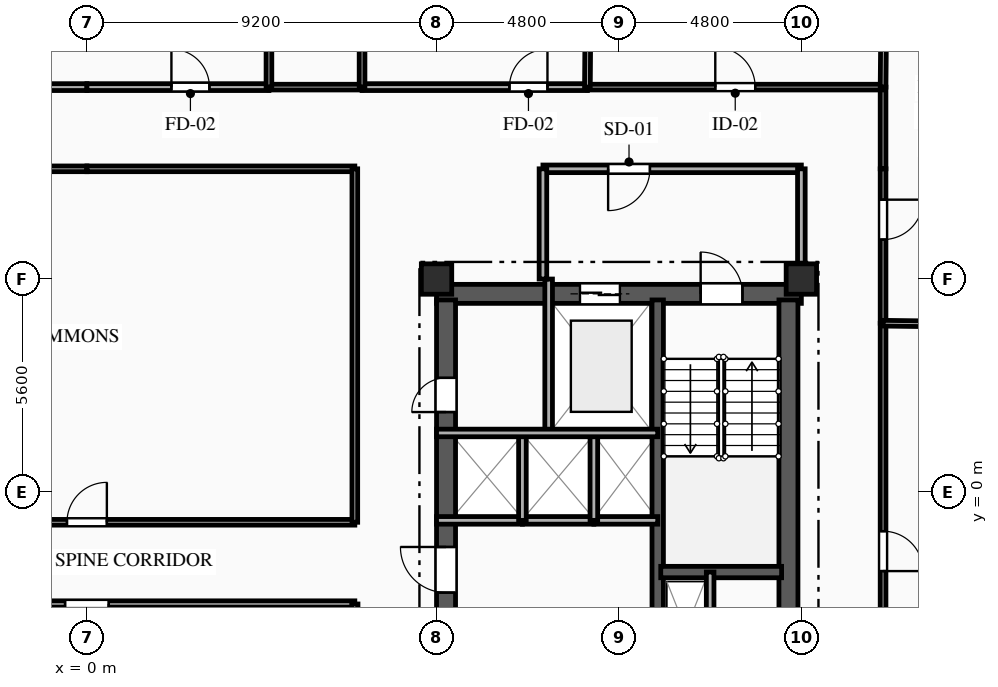
"""IFC4 building model, lengths in metres.
Left out: names, types, materials, properties, quantities, classifications, styles, units other than length and angle.
Written with IfcOpenShell. Run it as: python <this file> out.ifc"""

import sys

from ifc_helpers import new_model, si_unit, direction, frame, frame_2d, origin, origin_2d, place, context, subcontext, project, spatial, rectangle, extrude, element, fill, save


model = new_model("IFC4")
c1 = context("Model", 3, precision=1e-05, world=origin(), true_north=direction((0.0, 1.0)))
c2 = subcontext(c1, "Body", "Model", "MODEL_VIEW")
j1 = project(units=[si_unit("LENGTHUNIT", "METRE"), si_unit("PLANEANGLEUNIT", "RADIAN")], contexts=[c1])
p1 = place(None, origin())
s1 = spatial("IfcSite", under=j1, at=p1, CompositionType="ELEMENT")
p2 = place(p1, origin())
s2 = spatial("IfcBuilding", under=s1, at=p2, CompositionType="ELEMENT")
p3 = place(p2, frame((0.0, 0.0, 209.8)))
s3 = spatial("IfcBuildingStorey", under=s2, at=p3, CompositionType="ELEMENT", Elevation=209.8)
for number, where, z_axis, x_axis in (
    (1, (9.2, 5.6, 0.0), (0.0, 0.0, 1.0), (1.0, 0.0, 0.0)),
    (2, (18.8, 5.6, 0.0), (0.0, 0.0, 1.0), (1.0, 0.0, 0.0)),
):
    element("IfcColumn", number, at=place(p3, frame(where, z_axis=z_axis, x_axis=x_axis)), inside=s3, PredefinedType="COLUMN", context=c2, shape_type="SweptSolid", body=[
        extrude(rectangle(XDim=0.8, YDim=0.8, at=origin_2d()), origin(), (0.0, 0.0, 1.0), 3.35),
    ])
p4 = place(p3, frame((9.2, 5.21, 0.0), z_axis=(0.0, 0.0, 1.0), x_axis=(1.0, 0.0, 0.0)))
e3 = element("IfcWall", 3, at=p4, inside=s3, PredefinedType="SHEAR", context=c2, shape_type="SweptSolid", body=[
    extrude(rectangle(XDim=9.6, YDim=0.5, at=frame_2d((4.8, 0.0))), origin(), (0.0, 0.0, 1.0), 3.04),
])
p5 = place(p4, frame((6.95, 0.0, 0.0)))
e4 = element("IfcOpeningElement", 4, at=p5, cuts=e3, PredefinedType="OPENING", context=c2, shape_type="SweptSolid", body=[
    extrude(rectangle(XDim=1.1, YDim=2.15, at=frame_2d((0.55, 1.075))), frame((0.0, 0.26, 0.0), z_axis=(0.0, -1.0, 0.0), x_axis=(1.0, 0.0, 0.0)), (0.0, 0.0, 1.0), 0.52),
])
p6 = place(p4, frame((3.775, 0.0, 0.0)))
e5 = element("IfcOpeningElement", 5, at=p6, cuts=e3, PredefinedType="OPENING", context=c2, shape_type="SweptSolid", body=[
    extrude(rectangle(XDim=1.05, YDim=2.1, at=frame_2d((0.525, 1.05))), frame((0.0, 0.26, 0.0), z_axis=(0.0, -1.0, 0.0), x_axis=(1.0, 0.0, 0.0)), (0.0, 0.0, 1.0), 0.52),
])
p7 = place(p3, frame((9.45, -5.05, 0.0), z_axis=(0.0, 0.0, 1.0), x_axis=(0.0, 1.0, 0.0)))
e6 = element("IfcWall", 6, at=p7, inside=s3, PredefinedType="SHEAR", context=c2, shape_type="SweptSolid", body=[
    extrude(rectangle(XDim=10.1, YDim=0.5, at=frame_2d((5.05, 0.0))), origin(), (0.0, 0.0, 1.0), 3.04),
])
p8 = place(p7, frame((7.15, 0.0, 0.0)))
e7 = element("IfcOpeningElement", 7, at=p8, cuts=e6, PredefinedType="OPENING", context=c2, shape_type="SweptSolid", body=[
    extrude(rectangle(XDim=0.9, YDim=2.1, at=frame_2d((0.45, 1.05))), frame((0.0, 0.26, 0.0), z_axis=(0.0, -1.0, 0.0), x_axis=(1.0, 0.0, 0.0)), (0.0, 0.0, 1.0), 0.52),
])
p9 = place(p7, frame((2.4, 0.0, 0.0)))
e8 = element("IfcOpeningElement", 8, at=p9, cuts=e6, PredefinedType="OPENING", context=c2, shape_type="SweptSolid", body=[
    extrude(rectangle(XDim=1.2, YDim=2.15, at=frame_2d((0.6, 1.075))), frame((0.0, 0.26, 0.0), z_axis=(0.0, -1.0, 0.0), x_axis=(1.0, 0.0, 0.0)), (0.0, 0.0, 1.0), 0.52),
])
p10 = place(p3, frame((18.46, -5.05, 0.0), z_axis=(0.0, 0.0, 1.0), x_axis=(0.0, 1.0, 0.0)))
e9 = element("IfcWall", 9, at=p10, inside=s3, PredefinedType="SHEAR", context=c2, shape_type="SweptSolid", body=[
    extrude(rectangle(XDim=10.1, YDim=0.5, at=frame_2d((5.05, 0.0))), origin(), (0.0, 0.0, 1.0), 3.04),
])
p11 = place(p3, frame((15.02, -5.05, 0.0), z_axis=(0.0, 0.0, 1.0), x_axis=(0.0, 1.0, 0.0)))
e10 = element("IfcWall", 10, at=p11, inside=s3, PredefinedType="SHEAR", context=c2, shape_type="SweptSolid", body=[
    extrude(rectangle(XDim=10.1, YDim=0.3, at=frame_2d((5.05, 0.0))), origin(), (0.0, 0.0, 1.0), 3.04),
])
p12 = place(p3, frame((15.1, -2.11, 0.0), z_axis=(0.0, 0.0, 1.0), x_axis=(1.0, 0.0, 0.0)))
e11 = element("IfcWall", 11, at=p12, inside=s3, PredefinedType="SHEAR", context=c2, shape_type="SweptSolid", body=[
    extrude(rectangle(XDim=3.18, YDim=0.3, at=frame_2d((1.59, 0.0))), origin(), (0.0, 0.0, 1.0), 3.04),
])
p13 = place(p3, frame((16.4, -2.11, 0.0), z_axis=(0.0, 0.0, 1.0), x_axis=(0.0, -1.0, 0.0)))
e12 = element("IfcWall", 12, at=p13, inside=s3, PredefinedType="PARTITIONING", context=c2, shape_type="SweptSolid", body=[
    extrude(rectangle(XDim=3.49, YDim=0.2, at=frame_2d((1.745, 0.0))), origin(), (0.0, 0.0, 1.0), 3.04),
])
p14 = place(p3, frame((12.15, 5.6, 0.0), z_axis=(0.0, 0.0, 1.0), x_axis=(0.0, -1.0, 0.0)))
e13 = element("IfcWall", 13, at=p14, inside=s3, PredefinedType="PARTITIONING", context=c2, shape_type="SweptSolid", body=[
    extrude(rectangle(XDim=4.05, YDim=0.2, at=frame_2d((2.025, 0.0))), origin(), (0.0, 0.0, 1.0), 3.04),
])
p15 = place(p3, frame((18.8, 8.5, 0.0), z_axis=(0.0, 0.0, 1.0), x_axis=(-1.0, 0.0, 0.0)))
e14 = element("IfcWall", 14, at=p15, inside=s3, PredefinedType="PARTITIONING", context=c2, shape_type="SweptSolid", body=[
    extrude(rectangle(XDim=6.8, YDim=0.2, at=frame_2d((3.4, 0.0))), origin(), (0.0, 0.0, 1.0), 3.04),
])
p16 = place(p15, frame((3.985, 0.0, 0.0)))
e15 = element("IfcOpeningElement", 15, at=p16, cuts=e14, PredefinedType="OPENING", context=c2, shape_type="SweptSolid", body=[
    extrude(rectangle(XDim=1.1, YDim=2.15, at=frame_2d((0.55, 1.075))), frame((0.0, 0.11, 0.0), z_axis=(0.0, -1.0, 0.0), x_axis=(1.0, 0.0, 0.0)), (0.0, 0.0, 1.0), 0.22),
])
p17 = place(p3, frame((18.8, 5.6, 0.0), z_axis=(0.0, 0.0, 1.0), x_axis=(0.0, 1.0, 0.0)))
e16 = element("IfcWall", 16, at=p17, inside=s3, PredefinedType="PARTITIONING", context=c2, shape_type="SweptSolid", body=[
    extrude(rectangle(XDim=2.9, YDim=0.2, at=frame_2d((1.45, 0.0))), origin(), (0.0, 0.0, 1.0), 2.665),
])
p18 = place(p3, frame((12.0, 8.5, 0.0), z_axis=(0.0, 0.0, 1.0), x_axis=(0.0, -1.0, 0.0)))
e17 = element("IfcWall", 17, at=p18, inside=s3, PredefinedType="PARTITIONING", context=c2, shape_type="SweptSolid", body=[
    extrude(rectangle(XDim=2.9, YDim=0.2, at=frame_2d((1.45, 0.0))), origin(), (0.0, 0.0, 1.0), 3.04),
])
p19 = place(p3, frame((11.46, -0.75, 0.0), z_axis=(0.0, 0.0, 1.0), x_axis=(-1.0, 0.0, 0.0)))
e18 = element("IfcWall", 18, at=p19, inside=s3, PredefinedType="PARTITIONING", context=c2, shape_type="SweptSolid", body=[
    extrude(rectangle(XDim=2.26, YDim=0.2, at=frame_2d((1.13, 0.0))), origin(), (0.0, 0.0, 1.0), 3.04),
])
p20 = place(p3, frame((13.34, -0.75, 0.0), z_axis=(0.0, 0.0, 1.0), x_axis=(-1.0, 0.0, 0.0)))
e19 = element("IfcWall", 19, at=p20, inside=s3, PredefinedType="PARTITIONING", context=c2, shape_type="SweptSolid", body=[
    extrude(rectangle(XDim=1.88, YDim=0.2, at=frame_2d((0.94, 0.0))), origin(), (0.0, 0.0, 1.0), 3.04),
])
p21 = place(p3, frame((15.02, -0.75, 0.0), z_axis=(0.0, 0.0, 1.0), x_axis=(-1.0, 0.0, 0.0)))
e20 = element("IfcWall", 20, at=p21, inside=s3, PredefinedType="PARTITIONING", context=c2, shape_type="SweptSolid", body=[
    extrude(rectangle(XDim=1.68, YDim=0.2, at=frame_2d((0.84, 0.0))), origin(), (0.0, 0.0, 1.0), 3.04),
])
for number, where, z_axis, x_axis in (
    (21, (11.46, -0.75, 0.0), (0.0, 0.0, 1.0), (0.0, 1.0, 0.0)),
    (22, (13.34, -0.75, 0.0), (0.0, 0.0, 1.0), (0.0, 1.0, 0.0)),
):
    element("IfcWall", number, at=place(p3, frame(where, z_axis=z_axis, x_axis=x_axis)), inside=s3, PredefinedType="PARTITIONING", context=c2, shape_type="SweptSolid", body=[
        extrude(rectangle(XDim=2.3, YDim=0.2, at=frame_2d((1.15, 0.0))), origin(), (0.0, 0.0, 1.0), 3.04),
    ])
p22 = place(p3, frame((-1.14, 10.65, 0.0), z_axis=(0.0, 0.0, 1.0), x_axis=(1.0, 0.0, 0.0)))
e23 = element("IfcWall", 23, at=p22, inside=s3, PredefinedType="PARTITIONING", context=c2, shape_type="SweptSolid", body=[
    extrude(rectangle(XDim=1.14, YDim=0.18, at=frame_2d((0.57, 0.0))), origin(), (0.0, 0.0, 1.0), 3.04),
])
p23 = place(p3, frame((0.0, 8.5, 0.0), z_axis=(0.0, 0.0, 1.0), x_axis=(-1.0, 0.0, 0.0)))
e24 = element("IfcWall", 24, at=p23, inside=s3, PredefinedType="PARTITIONING", context=c2, shape_type="SweptSolid", body=[
    extrude(rectangle(XDim=7.05, YDim=0.15, at=frame_2d((3.525, 0.0))), origin(), (0.0, 0.0, 1.0), 3.04),
])
p24 = place(p3, frame((20.95, 10.65, 0.0), z_axis=(0.0, 0.0, 1.0), x_axis=(0.0, -1.0, 0.0)))
e25 = element("IfcWall", 25, at=p24, inside=s3, PredefinedType="PARTITIONING", context=c2, shape_type="SweptSolid", body=[
    extrude(rectangle(XDim=2.15, YDim=0.15, at=frame_2d((1.075, 0.0))), origin(), (0.0, 0.0, 1.0), 3.04),
])
p25 = place(p3, frame((0.0, 10.65, 0.0), z_axis=(0.0, 0.0, 1.0), x_axis=(1.0, 0.0, 0.0)))
e26 = element("IfcWall", 26, at=p25, inside=s3, PredefinedType="PARTITIONING", context=c2, shape_type="SweptSolid", body=[
    extrude(rectangle(XDim=4.79, YDim=0.18, at=frame_2d((2.395, 0.0))), origin(), (0.0, 0.0, 1.0), 3.04),
])
p26 = place(p25, frame((2.224, 0.0, 0.0)))
e27 = element("IfcOpeningElement", 27, at=p26, cuts=e26, PredefinedType="OPENING", context=c2, shape_type="SweptSolid", body=[
    extrude(rectangle(XDim=1.0, YDim=2.15, at=frame_2d((0.5, 1.075))), frame((0.0, 0.1, 0.0), z_axis=(0.0, -1.0, 0.0), x_axis=(1.0, 0.0, 0.0)), (0.0, 0.0, 1.0), 0.2),
])
p27 = place(p3, frame((7.24, 10.65, 0.0), z_axis=(0.0, 0.0, 1.0), x_axis=(1.0, 0.0, 0.0)))
e28 = element("IfcWall", 28, at=p27, inside=s3, PredefinedType="PARTITIONING", context=c2, shape_type="SweptSolid", body=[
    extrude(rectangle(XDim=5.93, YDim=0.18, at=frame_2d((2.965, 0.0))), origin(), (0.0, 0.0, 1.0), 3.04),
])
p28 = place(p27, frame((3.879, 0.0, 0.0)))
e29 = element("IfcOpeningElement", 29, at=p28, cuts=e28, PredefinedType="OPENING", context=c2, shape_type="SweptSolid", body=[
    extrude(rectangle(XDim=1.0, YDim=2.15, at=frame_2d((0.5, 1.075))), frame((0.0, 0.1, 0.0), z_axis=(0.0, -1.0, 0.0), x_axis=(1.0, 0.0, 0.0)), (0.0, 0.0, 1.0), 0.2),
])
p29 = place(p3, frame((4.79, 10.65, 0.0), z_axis=(0.0, 0.0, 1.0), x_axis=(1.0, 0.0, 0.0)))
e30 = element("IfcWall", 30, at=p29, inside=s3, PredefinedType="PLUMBINGWALL", context=c2, shape_type="SweptSolid", body=[
    extrude(rectangle(XDim=2.45, YDim=0.15, at=frame_2d((1.225, 0.0))), origin(), (0.0, 0.0, 1.0), 3.04),
])
p30 = place(p3, frame((13.17, 10.65, 0.0), z_axis=(0.0, 0.0, 1.0), x_axis=(1.0, 0.0, 0.0)))
e31 = element("IfcWall", 31, at=p30, inside=s3, PredefinedType="PARTITIONING", context=c2, shape_type="SweptSolid", body=[
    extrude(rectangle(XDim=7.78, YDim=0.15, at=frame_2d((3.89, 0.0))), origin(), (0.0, 0.0, 1.0), 3.04),
])
p31 = place(p30, frame((3.365, 0.0, 0.0)))
e32 = element("IfcOpeningElement", 32, at=p31, cuts=e31, PredefinedType="OPENING", context=c2, shape_type="SweptSolid", body=[
    extrude(rectangle(XDim=1.05, YDim=2.15, at=frame_2d((0.525, 1.075))), frame((0.0, 0.085, 0.0), z_axis=(0.0, -1.0, 0.0), x_axis=(1.0, 0.0, 0.0)), (0.0, 0.0, 1.0), 0.17),
])
p32 = place(p3, frame((7.05, 8.5, 0.0), z_axis=(0.0, 0.0, 1.0), x_axis=(-1.0, 0.0, 0.0)))
e33 = element("IfcWall", 33, at=p32, inside=s3, PredefinedType="PARTITIONING", context=c2, shape_type="SweptSolid", body=[
    extrude(rectangle(XDim=7.05, YDim=0.15, at=frame_2d((3.525, 0.0))), origin(), (0.0, 0.0, 1.0), 3.04),
])
p33 = place(p3, frame((20.95, 4.438, 0.0), z_axis=(0.0, 0.0, 1.0), x_axis=(0.0, -1.0, 0.0)))
e34 = element("IfcWall", 34, at=p33, inside=s3, PredefinedType="PARTITIONING", context=c2, shape_type="SweptSolid", body=[
    extrude(rectangle(XDim=10.038, YDim=0.15, at=frame_2d((5.019, 0.0))), origin(), (0.0, 0.0, 1.0), 2.695),
])
p34 = place(p33, frame((5.472, 0.0, 0.0)))
e35 = element("IfcOpeningElement", 35, at=p34, cuts=e34, PredefinedType="OPENING", context=c2, shape_type="SweptSolid", body=[
    extrude(rectangle(XDim=1.05, YDim=2.15, at=frame_2d((0.525, 1.075))), frame((0.0, 0.085, 0.0), z_axis=(0.0, -1.0, 0.0), x_axis=(1.0, 0.0, 0.0)), (0.0, 0.0, 1.0), 0.17),
])
p35 = place(p3, frame((20.95, 8.5, 0.0), z_axis=(0.0, 0.0, 1.0), x_axis=(0.0, -1.0, 0.0)))
e36 = element("IfcWall", 36, at=p35, inside=s3, PredefinedType="PARTITIONING", context=c2, shape_type="SweptSolid", body=[
    extrude(rectangle(XDim=4.062, YDim=0.15, at=frame_2d((2.031, 0.0))), origin(), (0.0, 0.0, 1.0), 3.04),
])
p36 = place(p35, frame((0.812, 0.0, 0.0)))
e37 = element("IfcOpeningElement", 37, at=p36, cuts=e36, PredefinedType="OPENING", context=c2, shape_type="SweptSolid", body=[
    extrude(rectangle(XDim=1.05, YDim=2.15, at=frame_2d((0.525, 1.075))), frame((0.0, 0.085, 0.0), z_axis=(0.0, -1.0, 0.0), x_axis=(1.0, 0.0, 0.0)), (0.0, 0.0, 1.0), 0.17),
])
p37 = place(p3, frame((-7.05, -0.8, 0.0), z_axis=(0.0, 0.0, 1.0), x_axis=(1.0, 0.0, 0.0)))
e38 = element("IfcWall", 38, at=p37, inside=s3, PredefinedType="PARTITIONING", context=c2, shape_type="SweptSolid", body=[
    extrude(rectangle(XDim=14.1, YDim=0.15, at=frame_2d((7.05, 0.0))), origin(), (0.0, 0.0, 1.0), 3.04),
])
p38 = place(p37, frame((6.525, 0.0, 0.0)))
e39 = element("IfcOpeningElement", 39, at=p38, cuts=e38, PredefinedType="OPENING", context=c2, shape_type="SweptSolid", body=[
    extrude(rectangle(XDim=1.05, YDim=2.15, at=frame_2d((0.525, 1.075))), frame((0.0, 0.085, 0.0), z_axis=(0.0, -1.0, 0.0), x_axis=(1.0, 0.0, 0.0)), (0.0, 0.0, 1.0), 0.17),
])
p39 = place(p3, frame((7.05, -2.95, 0.0), z_axis=(0.0, 0.0, 1.0), x_axis=(-1.0, 0.0, 0.0)))
e40 = element("IfcWall", 40, at=p39, inside=s3, PredefinedType="PARTITIONING", context=c2, shape_type="SweptSolid", body=[
    extrude(rectangle(XDim=14.1, YDim=0.165, at=frame_2d((7.05, 0.0))), origin(), (0.0, 0.0, 1.0), 3.04),
])
p40 = place(p39, frame((6.475, 0.0, 0.0)))
e41 = element("IfcOpeningElement", 41, at=p40, cuts=e40, PredefinedType="OPENING", context=c2, shape_type="SweptSolid", body=[
    extrude(rectangle(XDim=1.15, YDim=2.15, at=frame_2d((0.575, 1.075))), frame((0.0, 0.093, 0.0), z_axis=(0.0, -1.0, 0.0), x_axis=(1.0, 0.0, 0.0)), (0.0, 0.0, 1.0), 0.185),
])
p41 = place(p3, frame((7.05, -0.8, 0.0), z_axis=(0.0, 0.0, 1.0), x_axis=(0.0, 1.0, 0.0)))
e42 = element("IfcWall", 42, at=p41, inside=s3, PredefinedType="PARTITIONING", context=c2, shape_type="SweptSolid", body=[
    extrude(rectangle(XDim=9.3, YDim=0.15, at=frame_2d((4.65, 0.0))), origin(), (0.0, 0.0, 1.0), 3.04),
])
p42 = place(p3, frame((7.05, -5.6, 0.0), z_axis=(0.0, 0.0, 1.0), x_axis=(0.0, 1.0, 0.0)))
e43 = element("IfcWall", 43, at=p42, inside=s3, PredefinedType="PARTITIONING", context=c2, shape_type="SweptSolid", body=[
    extrude(rectangle(XDim=2.65, YDim=0.165, at=frame_2d((1.325, 0.0))), origin(), (0.0, 0.0, 1.0), 3.04),
])
p43 = place(p3, frame((20.95, 4.438, 0.0), z_axis=(0.0, 0.0, 1.0), x_axis=(0.999913116238, -0.013181804667, 0.0)))
e44 = element("IfcWall", 44, at=p43, inside=s3, PredefinedType="PARTITIONING", context=c2, shape_type="SweptSolid", body=[
    extrude(rectangle(XDim=3.334, YDim=0.15, at=frame_2d((1.667, 0.0))), origin(), (0.0, 0.0, 1.0), 3.04),
])
p44 = place(p3, frame((20.95, 10.65, 0.0), z_axis=(0.0, 0.0, 1.0), x_axis=(0.009535990233, 0.999954531411, 0.0)))
e45 = element("IfcWall", 45, at=p44, inside=s3, PredefinedType="PARTITIONING", context=c2, shape_type="SweptSolid", body=[
    extrude(rectangle(XDim=4.608, YDim=0.15, at=frame_2d((2.304, 0.0))), origin(), (0.0, 0.0, 1.0), 2.665),
])
for number, where, z_axis, x_axis in (
    (46, (4.79, 12.8, 0.0), (0.0, 0.0, 1.0), (0.0, -1.0, 0.0)),
    (47, (7.24, 10.65, 0.0), (0.0, 0.0, 1.0), (0.0, 1.0, 0.0)),
):
    element("IfcWall", number, at=place(p3, frame(where, z_axis=z_axis, x_axis=x_axis)), inside=s3, PredefinedType="PLUMBINGWALL", context=c2, shape_type="SweptSolid", body=[
        extrude(rectangle(XDim=2.15, YDim=0.15, at=frame_2d((1.075, 0.0))), origin(), (0.0, 0.0, 1.0), 3.04),
    ])
p45 = place(p3, frame((13.214, 16.076, 0.0), z_axis=(0.0, 0.0, 1.0), x_axis=(-0.008099086408, -0.999967201862, 0.0)))
e48 = element("IfcWall", 48, at=p45, inside=s3, PredefinedType="PARTITIONING", context=c2, shape_type="SweptSolid", body=[
    extrude(rectangle(XDim=5.426, YDim=0.15, at=frame_2d((2.713, 0.0))), origin(), (0.0, 0.0, 1.0), 3.04),
])
p46 = place(p3, frame((9.2, 1.55, 0.0), z_axis=(0.0, 0.0, 1.0), x_axis=(1.0, 0.0, 0.0)))
e49 = element("IfcWall", 49, at=p46, inside=s3, PredefinedType="PARTITIONING", context=c2, shape_type="SweptSolid", body=[
    extrude(rectangle(XDim=5.82, YDim=0.2, at=frame_2d((2.91, 0.0))), origin(), (0.0, 0.0, 1.0), 3.04),
])
p47 = place(p5, origin())
e50 = element("IfcDoor", 50, at=p47, inside=s3, OperationType="SINGLE_SWING_LEFT", PredefinedType="DOOR", context=c2, shape_type="SweptSolid", body=[
    extrude(rectangle(XDim=1.1, YDim=2.15, at=frame_2d((0.55, 1.075))), frame((0.0, 0.025, 0.0), z_axis=(0.0, -1.0, 0.0), x_axis=(1.0, 0.0, 0.0)), (0.0, 0.0, 1.0), 0.05),
])
fill(e4, e50)
p48 = place(p6, origin())
e51 = element("IfcDoor", 51, at=p48, inside=s3, OperationType="DOUBLE_DOOR_SLIDING", PredefinedType="DOOR", context=c2, shape_type="SweptSolid", body=[
    extrude(rectangle(XDim=1.05, YDim=2.1, at=frame_2d((0.525, 1.05))), frame((0.0, 0.025, 0.0), z_axis=(0.0, -1.0, 0.0), x_axis=(1.0, 0.0, 0.0)), (0.0, 0.0, 1.0), 0.05),
])
fill(e5, e51)
p49 = place(p16, origin())
e52 = element("IfcDoor", 52, at=p49, inside=s3, OperationType="SINGLE_SWING_RIGHT", PredefinedType="DOOR", context=c2, shape_type="SweptSolid", body=[
    extrude(rectangle(XDim=1.1, YDim=2.15, at=frame_2d((0.55, 1.075))), frame((0.0, 0.025, 0.0), z_axis=(0.0, -1.0, 0.0), x_axis=(1.0, 0.0, 0.0)), (0.0, 0.0, 1.0), 0.05),
])
fill(e15, e52)
p50 = place(p8, origin())
e53 = element("IfcDoor", 53, at=p50, inside=s3, OperationType="SINGLE_SWING_LEFT", PredefinedType="DOOR", context=c2, shape_type="SweptSolid", body=[
    extrude(rectangle(XDim=0.9, YDim=2.1, at=frame_2d((0.45, 1.05))), frame((0.0, 0.025, 0.0), z_axis=(0.0, -1.0, 0.0), x_axis=(1.0, 0.0, 0.0)), (0.0, 0.0, 1.0), 0.05),
])
fill(e7, e53)
p51 = place(p9, origin())
e54 = element("IfcDoor", 54, at=p51, inside=s3, OperationType="SINGLE_SWING_RIGHT", PredefinedType="DOOR", context=c2, shape_type="SweptSolid", body=[
    extrude(rectangle(XDim=1.2, YDim=2.15, at=frame_2d((0.6, 1.075))), frame((0.0, 0.025, 0.0), z_axis=(0.0, -1.0, 0.0), x_axis=(1.0, 0.0, 0.0)), (0.0, 0.0, 1.0), 0.05),
])
fill(e8, e54)
p52 = place(p26, origin())
e55 = element("IfcDoor", 55, at=p52, inside=s3, OperationType="SINGLE_SWING_LEFT", PredefinedType="DOOR", context=c2, shape_type="SweptSolid", body=[
    extrude(rectangle(XDim=1.0, YDim=2.15, at=frame_2d((0.5, 1.075))), frame((0.0, 0.025, 0.0), z_axis=(0.0, -1.0, 0.0), x_axis=(1.0, 0.0, 0.0)), (0.0, 0.0, 1.0), 0.05),
])
fill(e27, e55)
p53 = place(p28, origin())
e56 = element("IfcDoor", 56, at=p53, inside=s3, OperationType="SINGLE_SWING_RIGHT", PredefinedType="DOOR", context=c2, shape_type="SweptSolid", body=[
    extrude(rectangle(XDim=1.0, YDim=2.15, at=frame_2d((0.5, 1.075))), frame((0.0, 0.025, 0.0), z_axis=(0.0, -1.0, 0.0), x_axis=(1.0, 0.0, 0.0)), (0.0, 0.0, 1.0), 0.05),
])
fill(e29, e56)
p54 = place(p31, origin())
e57 = element("IfcDoor", 57, at=p54, inside=s3, OperationType="SINGLE_SWING_LEFT", PredefinedType="DOOR", context=c2, shape_type="SweptSolid", body=[
    extrude(rectangle(XDim=1.05, YDim=2.15, at=frame_2d((0.525, 1.075))), frame((0.0, 0.025, 0.0), z_axis=(0.0, -1.0, 0.0), x_axis=(1.0, 0.0, 0.0)), (0.0, 0.0, 1.0), 0.05),
])
fill(e32, e57)
p55 = place(p34, origin())
e58 = element("IfcDoor", 58, at=p55, inside=s3, OperationType="SINGLE_SWING_RIGHT", PredefinedType="DOOR", context=c2, shape_type="SweptSolid", body=[
    extrude(rectangle(XDim=1.05, YDim=2.15, at=frame_2d((0.525, 1.075))), frame((0.0, 0.025, 0.0), z_axis=(0.0, -1.0, 0.0), x_axis=(1.0, 0.0, 0.0)), (0.0, 0.0, 1.0), 0.05),
])
fill(e35, e58)
p56 = place(p36, origin())
e59 = element("IfcDoor", 59, at=p56, inside=s3, OperationType="SINGLE_SWING_LEFT", PredefinedType="DOOR", context=c2, shape_type="SweptSolid", body=[
    extrude(rectangle(XDim=1.05, YDim=2.15, at=frame_2d((0.525, 1.075))), frame((0.0, 0.025, 0.0), z_axis=(0.0, -1.0, 0.0), x_axis=(1.0, 0.0, 0.0)), (0.0, 0.0, 1.0), 0.05),
])
fill(e37, e59)
p57 = place(p38, origin())
e60 = element("IfcDoor", 60, at=p57, inside=s3, OperationType="SINGLE_SWING_RIGHT", PredefinedType="DOOR", context=c2, shape_type="SweptSolid", body=[
    extrude(rectangle(XDim=1.05, YDim=2.15, at=frame_2d((0.525, 1.075))), frame((0.0, 0.025, 0.0), z_axis=(0.0, -1.0, 0.0), x_axis=(1.0, 0.0, 0.0)), (0.0, 0.0, 1.0), 0.05),
])
fill(e39, e60)
p58 = place(p40, origin())
e61 = element("IfcDoor", 61, at=p58, inside=s3, OperationType="SINGLE_SWING_LEFT", PredefinedType="DOOR", context=c2, shape_type="SweptSolid", body=[
    extrude(rectangle(XDim=1.15, YDim=2.15, at=frame_2d((0.575, 1.075))), frame((0.0, 0.025, 0.0), z_axis=(0.0, -1.0, 0.0), x_axis=(1.0, 0.0, 0.0)), (0.0, 0.0, 1.0), 0.05),
])
fill(e41, e61)
save(model, sys.argv[1])
